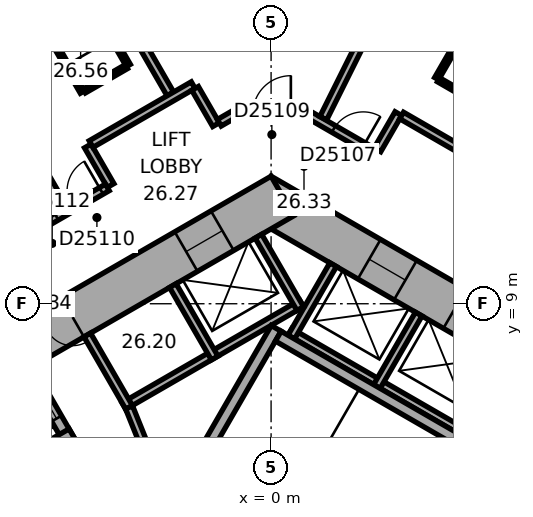
"""IFC4 building model, lengths in metres.
Left out: names, types, materials, properties, quantities, classifications, styles, units other than length and angle.
Written with IfcOpenShell. Run it as: python <this file> out.ifc"""

import sys

from ifc_helpers import new_model, si_unit, direction, frame, frame_2d, origin, place, context, subcontext, project, spatial, rectangle, extrude, element, fill, save


model = new_model("IFC4")
c1 = context("Model", 3, precision=1e-05, world=origin(), true_north=direction((0.0, 1.0)))
c2 = subcontext(c1, "Body", "Model", "MODEL_VIEW")
j1 = project(units=[si_unit("LENGTHUNIT", "METRE"), si_unit("PLANEANGLEUNIT", "RADIAN")], contexts=[c1])
p1 = place(None, origin())
s1 = spatial("IfcSite", under=j1, at=p1, CompositionType="ELEMENT")
p2 = place(p1, origin())
s2 = spatial("IfcBuilding", under=s1, at=p2, CompositionType="ELEMENT")
p3 = place(p2, frame((0.0, 0.0, 110.0)))
s3 = spatial("IfcBuildingStorey", under=s2, at=p3, CompositionType="ELEMENT", Elevation=110.0)
p4 = place(p3, frame((10.4, 5.658, 0.0), z_axis=(0.0, 0.0, 1.0), x_axis=(-0.866021384402, 0.500006961711, 0.0)))
e1 = element("IfcWall", 1, at=p4, inside=s3, PredefinedType="SHEAR", context=c2, shape_type="SweptSolid", body=[
    extrude(rectangle(XDim=12.355, YDim=1.2, at=frame_2d((6.178, 0.0))), origin(), (0.0, 0.0, 1.0), 3.3),
])
p5 = place(p4, frame((2.728, 0.0, 0.0)))
e2 = element("IfcOpeningElement", 2, at=p5, cuts=e1, PredefinedType="OPENING", context=c2, shape_type="SweptSolid", body=[
    extrude(rectangle(XDim=1.1, YDim=2.1, at=frame_2d((0.55, 1.05))), frame((0.0, 0.61, 0.0), z_axis=(0.0, -1.0, 0.0), x_axis=(1.0, 0.0, 0.0)), (0.0, 0.0, 1.0), 1.22),
])
p6 = place(p4, frame((5.328, 0.0, 0.0)))
e3 = element("IfcOpeningElement", 3, at=p6, cuts=e1, PredefinedType="OPENING", context=c2, shape_type="SweptSolid", body=[
    extrude(rectangle(XDim=1.1, YDim=2.1, at=frame_2d((0.55, 1.05))), frame((0.0, 0.61, 0.0), z_axis=(0.0, -1.0, 0.0), x_axis=(1.0, 0.0, 0.0)), (0.0, 0.0, 1.0), 1.22),
])
p7 = place(p4, frame((7.928, 0.0, 0.0)))
e4 = element("IfcOpeningElement", 4, at=p7, cuts=e1, PredefinedType="OPENING", context=c2, shape_type="SweptSolid", body=[
    extrude(rectangle(XDim=1.1, YDim=2.1, at=frame_2d((0.55, 1.05))), frame((0.0, 0.61, 0.0), z_axis=(0.0, -1.0, 0.0), x_axis=(1.0, 0.0, 0.0)), (0.0, 0.0, 1.0), 1.22),
])
p8 = place(p3, frame((0.3, 11.836, 0.0), z_axis=(0.0, 0.0, 1.0), x_axis=(-0.866021384402, -0.500006961711, 0.0)))
e5 = element("IfcWall", 5, at=p8, inside=s3, PredefinedType="SHEAR", context=c2, shape_type="SweptSolid", body=[
    extrude(rectangle(XDim=12.355, YDim=1.2, at=frame_2d((6.178, 0.0))), origin(), (0.0, 0.0, 1.0), 3.3),
])
p9 = place(p8, frame((6.378, 0.0, 0.0)))
e6 = element("IfcOpeningElement", 6, at=p9, cuts=e5, PredefinedType="OPENING", context=c2, shape_type="SweptSolid", body=[
    extrude(rectangle(XDim=1.5, YDim=2.1, at=frame_2d((0.75, 1.05))), frame((0.0, 0.61, 0.0), z_axis=(0.0, -1.0, 0.0), x_axis=(1.0, 0.0, 0.0)), (0.0, 0.0, 1.0), 1.22),
])
p10 = place(p8, frame((1.828, 0.0, 0.0)))
e7 = element("IfcOpeningElement", 7, at=p10, cuts=e5, PredefinedType="OPENING", context=c2, shape_type="SweptSolid", body=[
    extrude(rectangle(XDim=1.1, YDim=2.1, at=frame_2d((0.55, 1.05))), frame((0.0, 0.61, 0.0), z_axis=(0.0, -1.0, 0.0), x_axis=(1.0, 0.0, 0.0)), (0.0, 0.0, 1.0), 1.22),
])
p11 = place(p3, frame((20.63, 15.47, 0.0), z_axis=(0.0, 0.0, 1.0), x_axis=(-0.894934518609, 0.446197498203, 0.0)))
e8 = element("IfcWall", 8, at=p11, inside=s3, PredefinedType="STANDARD", context=c2, shape_type="SweptSolid", body=[
    extrude(rectangle(XDim=21.246, YDim=0.2, at=frame_2d((10.623, 0.0))), origin(), (0.0, 0.0, 1.0), 3.3),
])
p12 = place(p11, frame((1.553, 0.0, 0.8)))
e9 = element("IfcOpeningElement", 9, at=p12, cuts=e8, PredefinedType="OPENING", context=c2, shape_type="SweptSolid", body=[
    extrude(rectangle(XDim=2.4, YDim=1.7, at=frame_2d((1.2, 0.85))), frame((0.0, 0.11, 0.0), z_axis=(0.0, -1.0, 0.0), x_axis=(1.0, 0.0, 0.0)), (0.0, 0.0, 1.0), 0.22),
])
p13 = place(p11, frame((5.488, 0.0, 0.8)))
e10 = element("IfcOpeningElement", 10, at=p13, cuts=e8, PredefinedType="OPENING", context=c2, shape_type="SweptSolid", body=[
    extrude(rectangle(XDim=2.4, YDim=1.7, at=frame_2d((1.2, 0.85))), frame((0.0, 0.11, 0.0), z_axis=(0.0, -1.0, 0.0), x_axis=(1.0, 0.0, 0.0)), (0.0, 0.0, 1.0), 0.22),
])
p14 = place(p11, frame((9.422, 0.0, 0.8)))
e11 = element("IfcOpeningElement", 11, at=p14, cuts=e8, PredefinedType="OPENING", context=c2, shape_type="SweptSolid", body=[
    extrude(rectangle(XDim=2.4, YDim=1.7, at=frame_2d((1.2, 0.85))), frame((0.0, 0.11, 0.0), z_axis=(0.0, -1.0, 0.0), x_axis=(1.0, 0.0, 0.0)), (0.0, 0.0, 1.0), 0.22),
])
p15 = place(p11, frame((13.357, 0.0, 0.8)))
e12 = element("IfcOpeningElement", 12, at=p15, cuts=e8, PredefinedType="OPENING", context=c2, shape_type="SweptSolid", body=[
    extrude(rectangle(XDim=2.4, YDim=1.7, at=frame_2d((1.2, 0.85))), frame((0.0, 0.11, 0.0), z_axis=(0.0, -1.0, 0.0), x_axis=(1.0, 0.0, 0.0)), (0.0, 0.0, 1.0), 0.22),
])
p16 = place(p11, frame((17.292, 0.0, 0.8)))
e13 = element("IfcOpeningElement", 13, at=p16, cuts=e8, PredefinedType="OPENING", context=c2, shape_type="SweptSolid", body=[
    extrude(rectangle(XDim=2.4, YDim=1.7, at=frame_2d((1.2, 0.85))), frame((0.0, 0.11, 0.0), z_axis=(0.0, -1.0, 0.0), x_axis=(1.0, 0.0, 0.0)), (0.0, 0.0, 1.0), 0.22),
])
p17 = place(p3, frame((-3.136, 24.805, 0.0), z_axis=(0.0, 0.0, 1.0), x_axis=(-0.866028291626, -0.499994998079, 0.0)))
e14 = element("IfcWall", 14, at=p17, inside=s3, PredefinedType="STANDARD", context=c2, shape_type="SweptSolid", body=[
    extrude(rectangle(XDim=21.246, YDim=0.2, at=frame_2d((10.623, 0.0))), origin(), (0.0, 0.0, 1.0), 3.3),
])
p18 = place(p17, frame((1.555, 0.0, 0.8)))
e15 = element("IfcOpeningElement", 15, at=p18, cuts=e14, PredefinedType="OPENING", context=c2, shape_type="SweptSolid", body=[
    extrude(rectangle(XDim=2.4, YDim=1.7, at=frame_2d((1.2, 0.85))), frame((0.0, 0.11, 0.0), z_axis=(0.0, -1.0, 0.0), x_axis=(1.0, 0.0, 0.0)), (0.0, 0.0, 1.0), 0.22),
])
p19 = place(p17, frame((5.489, 0.0, 0.8)))
e16 = element("IfcOpeningElement", 16, at=p19, cuts=e14, PredefinedType="OPENING", context=c2, shape_type="SweptSolid", body=[
    extrude(rectangle(XDim=2.4, YDim=1.7, at=frame_2d((1.2, 0.85))), frame((0.0, 0.11, 0.0), z_axis=(0.0, -1.0, 0.0), x_axis=(1.0, 0.0, 0.0)), (0.0, 0.0, 1.0), 0.22),
])
p20 = place(p17, frame((9.424, 0.0, 0.8)))
e17 = element("IfcOpeningElement", 17, at=p20, cuts=e14, PredefinedType="OPENING", context=c2, shape_type="SweptSolid", body=[
    extrude(rectangle(XDim=2.4, YDim=1.7, at=frame_2d((1.2, 0.85))), frame((0.0, 0.11, 0.0), z_axis=(0.0, -1.0, 0.0), x_axis=(1.0, 0.0, 0.0)), (0.0, 0.0, 1.0), 0.22),
])
p21 = place(p17, frame((13.358, 0.0, 0.8)))
e18 = element("IfcOpeningElement", 18, at=p21, cuts=e14, PredefinedType="OPENING", context=c2, shape_type="SweptSolid", body=[
    extrude(rectangle(XDim=2.4, YDim=1.7, at=frame_2d((1.2, 0.85))), frame((0.0, 0.11, 0.0), z_axis=(0.0, -1.0, 0.0), x_axis=(1.0, 0.0, 0.0)), (0.0, 0.0, 1.0), 0.22),
])
p22 = place(p17, frame((17.293, 0.0, 0.8)))
e19 = element("IfcOpeningElement", 19, at=p22, cuts=e14, PredefinedType="OPENING", context=c2, shape_type="SweptSolid", body=[
    extrude(rectangle(XDim=2.4, YDim=1.7, at=frame_2d((1.2, 0.85))), frame((0.0, 0.11, 0.0), z_axis=(0.0, -1.0, 0.0), x_axis=(1.0, 0.0, 0.0)), (0.0, 0.0, 1.0), 0.22),
])
p23 = place(p3, frame((7.424, 4.259, 0.0), z_axis=(0.0, 0.0, 1.0), x_axis=(-0.866026010844, 0.49999894854, 0.0)))
e20 = element("IfcWall", 20, at=p23, inside=s3, PredefinedType="PARTITIONING", context=c2, shape_type="SweptSolid", body=[
    extrude(rectangle(XDim=8.0, YDim=0.2, at=frame_2d((4.0, 0.0))), origin(), (0.0, 0.0, 1.0), 3.05),
])
for number, where, z_axis, x_axis in (
    (21, (2.784, 6.822, 0.0), (0.0, 0.0, 1.0), (0.5, 0.866, 0.0)),
    (22, (0.532, 8.122, 0.0), (0.0, 0.0, 1.0), (0.5, 0.866, 0.0)),
):
    element("IfcWall", number, at=place(p3, frame(where, z_axis=z_axis, x_axis=x_axis)), inside=s3, PredefinedType="PARTITIONING", context=c2, shape_type="SweptSolid", body=[
        extrude(rectangle(XDim=2.2, YDim=0.2, at=frame_2d((1.1, 0.0))), origin(), (0.0, 0.0, 1.0), 3.05),
    ])
p24 = place(p3, frame((0.803, 9.009, 0.0), z_axis=(0.0, 0.0, 1.0), x_axis=(-0.866028230842, -0.499995103361, 0.0)))
e23 = element("IfcWall", 23, at=p24, inside=s3, PredefinedType="PARTITIONING", context=c2, shape_type="SweptSolid", body=[
    extrude(rectangle(XDim=5.4, YDim=0.2, at=frame_2d((2.7, 0.0))), origin(), (0.0, 0.0, 1.0), 3.05),
])
p25 = place(p3, frame((0.767, 8.872, 0.0), z_axis=(0.0, 0.0, 1.0), x_axis=(-0.499994660107, 0.866028486751, 0.0)))
e24 = element("IfcWall", 24, at=p25, inside=s3, PredefinedType="PARTITIONING", context=c2, shape_type="SweptSolid", body=[
    extrude(rectangle(XDim=2.2, YDim=0.2, at=frame_2d((1.1, 0.0))), origin(), (0.0, 0.0, 1.0), 3.05),
])
for number, where, z_axis, x_axis in (
    (25, (-1.485, 7.572, 0.0), (0.0, 0.0, 1.0), (-0.5, 0.866, 0.0)),
    (26, (-3.737, 6.272, 0.0), (0.0, 0.0, 1.0), (-0.5, 0.866, 0.0)),
):
    element("IfcWall", number, at=place(p3, frame(where, z_axis=z_axis, x_axis=x_axis)), inside=s3, PredefinedType="PARTITIONING", context=c2, shape_type="SweptSolid", body=[
        extrude(rectangle(XDim=2.2, YDim=0.2, at=frame_2d((1.1, 0.0))), origin(), (0.0, 0.0, 1.0), 3.05),
    ])
p26 = place(p3, frame((-2.216, 4.282, 0.0), z_axis=(0.0, 0.0, 1.0), x_axis=(0.499977259774, 0.866038532462, 0.0)))
e27 = element("IfcWall", 27, at=p26, inside=s3, PredefinedType="SHEAR", context=c2, shape_type="SweptSolid", body=[
    extrude(rectangle(XDim=4.7, YDim=0.3, at=frame_2d((2.35, 0.0))), origin(), (0.0, 0.0, 1.0), 3.05),
])
p27 = place(p3, frame((6.303, 4.617, 0.0), z_axis=(0.0, 0.0, 1.0), x_axis=(-0.866027801685, 0.499995846692, 0.0)))
e28 = element("IfcWall", 28, at=p27, inside=s3, PredefinedType="SHEAR", context=c2, shape_type="SweptSolid", body=[
    extrude(rectangle(XDim=7.06, YDim=0.3, at=frame_2d((3.53, 0.0))), origin(), (0.0, 0.0, 1.0), 3.05),
])
p28 = place(p3, frame((-5.295, 5.372, 0.0), z_axis=(0.0, 0.0, 1.0), x_axis=(-0.500077893725, 0.86598042715, 0.0)))
e29 = element("IfcWall", 29, at=p28, inside=s3, PredefinedType="SHEAR", context=c2, shape_type="SweptSolid", body=[
    extrude(rectangle(XDim=2.2, YDim=0.3, at=frame_2d((1.1, 0.0))), origin(), (0.0, 0.0, 1.0), 3.05),
])
p29 = place(p28, frame((0.7, 0.0, 0.0)))
e30 = element("IfcOpeningElement", 30, at=p29, cuts=e29, PredefinedType="OPENING", context=c2, shape_type="SweptSolid", body=[
    extrude(rectangle(XDim=1.1, YDim=2.1, at=frame_2d((0.55, 1.05))), frame((0.0, 0.16, 0.0), z_axis=(0.0, -1.0, 0.0), x_axis=(1.0, 0.0, 0.0)), (0.0, 0.0, 1.0), 0.32),
])
p30 = place(p3, frame((-5.24, 5.577, 0.0), z_axis=(0.0, 0.0, 1.0), x_axis=(-0.866014461049, -0.500018952895, 0.0)))
e31 = element("IfcWall", 31, at=p30, inside=s3, PredefinedType="SHEAR", context=c2, shape_type="SweptSolid", body=[
    extrude(rectangle(XDim=3.35, YDim=0.3, at=frame_2d((1.675, 0.0))), origin(), (0.0, 0.0, 1.0), 3.05),
])
p31 = place(p3, frame((-2.615, 3.487, 0.0), z_axis=(0.0, 0.0, 1.0), x_axis=(-0.373576831041, 0.92759924068, 0.0)))
e32 = element("IfcWall", 32, at=p31, inside=s3, PredefinedType="PARTITIONING", context=c2, shape_type="SweptSolid", body=[
    extrude(rectangle(XDim=3.002, YDim=0.2, at=frame_2d((1.501, 0.0))), origin(), (0.0, 0.0, 1.0), 3.05),
])
p32 = place(p31, frame((1.15, 0.0, 0.0)))
e33 = element("IfcOpeningElement", 33, at=p32, cuts=e32, PredefinedType="OPENING", context=c2, shape_type="SweptSolid", body=[
    extrude(rectangle(XDim=0.9, YDim=2.1, at=frame_2d((0.45, 1.05))), frame((0.0, 0.11, 0.0), z_axis=(0.0, -1.0, 0.0), x_axis=(1.0, 0.0, 0.0)), (0.0, 0.0, 1.0), 0.22),
])
p33 = place(p3, frame((-10.083, 19.524, 0.0), z_axis=(0.0, 0.0, 1.0), x_axis=(0.499999662836, -0.866025598446, 0.0)))
e34 = element("IfcWall", 34, at=p33, inside=s3, PredefinedType="PARTITIONING", context=c2, shape_type="SweptSolid", body=[
    extrude(rectangle(XDim=9.25, YDim=0.2, at=frame_2d((4.625, 0.0))), origin(), (0.0, 0.0, 1.0), 2.6),
])
p34 = place(p3, frame((-6.676, 21.492, 0.0), z_axis=(0.0, 0.0, 1.0), x_axis=(0.500011263043, -0.866018900966, 0.0)))
e35 = element("IfcWall", 35, at=p34, inside=s3, PredefinedType="PARTITIONING", context=c2, shape_type="SweptSolid", body=[
    extrude(rectangle(XDim=8.049, YDim=0.2, at=frame_2d((4.024, 0.0))), origin(), (0.0, 0.0, 1.0), 3.05),
])
p35 = place(p3, frame((-5.026, 17.469, 0.0), z_axis=(0.0, 0.0, 1.0), x_axis=(0.500005339912, -0.866022320763, 0.0)))
e36 = element("IfcWall", 36, at=p35, inside=s3, PredefinedType="PARTITIONING", context=c2, shape_type="SweptSolid", body=[
    extrude(rectangle(XDim=2.54, YDim=0.12, at=frame_2d((1.27, 0.0))), origin(), (0.0, 0.0, 1.0), 3.05),
])
p36 = place(p3, frame((-4.968, 14.569, 0.0), z_axis=(0.0, 0.0, 1.0), x_axis=(-0.500046963369, 0.865998287773, 0.0)))
e37 = element("IfcWall", 37, at=p36, inside=s3, PredefinedType="PARTITIONING", context=c2, shape_type="SweptSolid", body=[
    extrude(rectangle(XDim=2.54, YDim=0.12, at=frame_2d((1.27, 0.0))), origin(), (0.0, 0.0, 1.0), 3.05),
])
p37 = place(p36, frame((0.82, 0.0, 0.0)))
e38 = element("IfcOpeningElement", 38, at=p37, cuts=e37, PredefinedType="OPENING", context=c2, shape_type="SweptSolid", body=[
    extrude(rectangle(XDim=0.9, YDim=2.1, at=frame_2d((0.45, 1.05))), frame((0.0, 0.07, 0.0), z_axis=(0.0, -1.0, 0.0), x_axis=(1.0, 0.0, 0.0)), (0.0, 0.0, 1.0), 0.14),
])
p38 = place(p3, frame((-4.823, 13.152, 0.0), z_axis=(0.0, 0.0, 1.0), x_axis=(0.499986357472, -0.866033280158, 0.0)))
e39 = element("IfcWall", 39, at=p38, inside=s3, PredefinedType="PARTITIONING", context=c2, shape_type="SweptSolid", body=[
    extrude(rectangle(XDim=1.201, YDim=0.2, at=frame_2d((0.601, 0.0))), origin(), (0.0, 0.0, 1.0), 3.05),
])
p39 = place(p3, frame((-4.309, 12.061, 0.0), z_axis=(0.0, 0.0, 1.0), x_axis=(-0.866020679205, -0.500008183122, 0.0)))
e40 = element("IfcWall", 40, at=p39, inside=s3, PredefinedType="PARTITIONING", context=c2, shape_type="SweptSolid", body=[
    extrude(rectangle(XDim=5.104, YDim=0.2, at=frame_2d((2.552, 0.0))), origin(), (0.0, 0.0, 1.0), 3.05),
])
p40 = place(p39, frame((0.185, 0.0, 0.0)))
e41 = element("IfcOpeningElement", 41, at=p40, cuts=e40, PredefinedType="OPENING", context=c2, shape_type="SweptSolid", body=[
    extrude(rectangle(XDim=0.9, YDim=2.1, at=frame_2d((0.45, 1.05))), frame((0.0, 0.11, 0.0), z_axis=(0.0, -1.0, 0.0), x_axis=(1.0, 0.0, 0.0)), (0.0, 0.0, 1.0), 0.22),
])
p41 = place(p39, frame((1.544, 0.0, 0.0)))
e42 = element("IfcOpeningElement", 42, at=p41, cuts=e40, PredefinedType="OPENING", context=c2, shape_type="SweptSolid", body=[
    extrude(rectangle(XDim=0.9, YDim=2.1, at=frame_2d((0.45, 1.05))), frame((0.0, 0.11, 0.0), z_axis=(0.0, -1.0, 0.0), x_axis=(1.0, 0.0, 0.0)), (0.0, 0.0, 1.0), 0.22),
])
p42 = place(p3, frame((-3.808, 15.239, 0.0), z_axis=(0.0, 0.0, 1.0), x_axis=(-0.866087136806, -0.499893060024, 0.0)))
e43 = element("IfcWall", 43, at=p42, inside=s3, PredefinedType="PARTITIONING", context=c2, shape_type="SweptSolid", body=[
    extrude(rectangle(XDim=1.28, YDim=0.12, at=frame_2d((0.64, 0.0))), origin(), (0.0, 0.0, 1.0), 3.05),
])
p43 = place(p3, frame((-2.05, 14.752, 0.0), z_axis=(0.0, 0.0, 1.0), x_axis=(-0.866030936828, -0.499990416364, 0.0)))
e44 = element("IfcWall", 44, at=p43, inside=s3, PredefinedType="PARTITIONING", context=c2, shape_type="SweptSolid", body=[
    extrude(rectangle(XDim=3.102, YDim=0.2, at=frame_2d((1.551, 0.0))), origin(), (0.0, 0.0, 1.0), 3.05),
])
p44 = place(p3, frame((-1.449, 13.712, 0.0), z_axis=(0.0, 0.0, 1.0), x_axis=(-0.499978356969, 0.866037899034, 0.0)))
e45 = element("IfcWall", 45, at=p44, inside=s3, PredefinedType="PARTITIONING", context=c2, shape_type="SweptSolid", body=[
    extrude(rectangle(XDim=1.101, YDim=0.2, at=frame_2d((0.551, 0.0))), origin(), (0.0, 0.0, 1.0), 3.05),
])
p45 = place(p3, frame((-0.95, 14.001, 0.0), z_axis=(0.0, 0.0, 1.0), x_axis=(-0.86609177584, -0.499885022602, 0.0)))
e46 = element("IfcWall", 46, at=p45, inside=s3, PredefinedType="PARTITIONING", context=c2, shape_type="SweptSolid", body=[
    extrude(rectangle(XDim=0.477, YDim=0.2, at=frame_2d((0.238, 0.0))), origin(), (0.0, 0.0, 1.0), 3.05),
])
p46 = place(p3, frame((0.95, 14.001, 0.0), z_axis=(0.0, 0.0, 1.0), x_axis=(-1.0, 0.0, 0.0)))
e47 = element("IfcWall", 47, at=p46, inside=s3, PredefinedType="PARTITIONING", context=c2, shape_type="SweptSolid", body=[
    extrude(rectangle(XDim=1.86, YDim=0.2, at=frame_2d((0.93, 0.0))), origin(), (0.0, 0.0, 1.0), 3.05),
])
p47 = place(p46, frame((0.43, 0.0, 0.0)))
e48 = element("IfcOpeningElement", 48, at=p47, cuts=e47, PredefinedType="OPENING", context=c2, shape_type="SweptSolid", body=[
    extrude(rectangle(XDim=1.0, YDim=2.1, at=frame_2d((0.5, 1.05))), frame((0.0, 0.11, 0.0), z_axis=(0.0, -1.0, 0.0), x_axis=(1.0, 0.0, 0.0)), (0.0, 0.0, 1.0), 0.22),
])
p48 = place(p3, frame((2.748, 12.962, 0.0), z_axis=(0.0, 0.0, 1.0), x_axis=(-0.866013897511, 0.50001992892, 0.0)))
e49 = element("IfcWall", 49, at=p48, inside=s3, PredefinedType="PARTITIONING", context=c2, shape_type="SweptSolid", body=[
    extrude(rectangle(XDim=2.037, YDim=0.2, at=frame_2d((1.018, 0.0))), origin(), (0.0, 0.0, 1.0), 3.05),
])
p49 = place(p48, frame((0.372, 0.0, 0.0)))
e50 = element("IfcOpeningElement", 50, at=p49, cuts=e49, PredefinedType="OPENING", context=c2, shape_type="SweptSolid", body=[
    extrude(rectangle(XDim=0.9, YDim=2.1, at=frame_2d((0.45, 1.05))), frame((0.0, 0.11, 0.0), z_axis=(0.0, -1.0, 0.0), x_axis=(1.0, 0.0, 0.0)), (0.0, 0.0, 1.0), 0.22),
])
p50 = place(p3, frame((3.349, 14.002, 0.0), z_axis=(0.0, 0.0, 1.0), x_axis=(-0.500074377092, -0.865982457891, 0.0)))
e51 = element("IfcWall", 51, at=p50, inside=s3, PredefinedType="PARTITIONING", context=c2, shape_type="SweptSolid", body=[
    extrude(rectangle(XDim=1.101, YDim=0.2, at=frame_2d((0.55, 0.0))), origin(), (0.0, 0.0, 1.0), 3.05),
])
p51 = place(p3, frame((4.356, 14.922, 0.0), z_axis=(0.0, 0.0, 1.0), x_axis=(0.499936506574, 0.866062058628, 0.0)))
e52 = element("IfcWall", 52, at=p51, inside=s3, PredefinedType="PARTITIONING", context=c2, shape_type="SweptSolid", body=[
    extrude(rectangle(XDim=2.6, YDim=0.12, at=frame_2d((1.3, 0.0))), origin(), (0.0, 0.0, 1.0), 3.05),
])
p52 = place(p51, frame((0.85, 0.0, 0.0)))
e53 = element("IfcOpeningElement", 53, at=p52, cuts=e52, PredefinedType="OPENING", context=c2, shape_type="SweptSolid", body=[
    extrude(rectangle(XDim=0.9, YDim=2.1, at=frame_2d((0.45, 1.05))), frame((0.0, 0.07, 0.0), z_axis=(0.0, -1.0, 0.0), x_axis=(1.0, 0.0, 0.0)), (0.0, 0.0, 1.0), 0.14),
])
p53 = place(p3, frame((5.351, 21.859, 0.0), z_axis=(0.0, 0.0, 1.0), x_axis=(-0.446205309328, -0.894930624086, 0.0)))
e54 = element("IfcWall", 54, at=p53, inside=s3, PredefinedType="PARTITIONING", context=c2, shape_type="SweptSolid", body=[
    extrude(rectangle(XDim=8.913, YDim=0.2, at=frame_2d((4.457, 0.0))), origin(), (0.0, 0.0, 1.0), 2.6),
])
p54 = place(p3, frame((5.569, 14.222, 0.0), z_axis=(0.0, 0.0, 1.0), x_axis=(-0.866036909293, 0.499980071345, 0.0)))
e55 = element("IfcWall", 55, at=p54, inside=s3, PredefinedType="PARTITIONING", context=c2, shape_type="SweptSolid", body=[
    extrude(rectangle(XDim=1.34, YDim=0.12, at=frame_2d((0.67, 0.0))), origin(), (0.0, 0.0, 1.0), 3.05),
])
p55 = place(p3, frame((10.885, 9.652, 0.0), z_axis=(0.0, 0.0, 1.0), x_axis=(-0.866033868542, 0.499985338323, 0.0)))
e56 = element("IfcWall", 56, at=p55, inside=s3, PredefinedType="PARTITIONING", context=c2, shape_type="SweptSolid", body=[
    extrude(rectangle(XDim=8.602, YDim=0.2, at=frame_2d((4.301, 0.0))), origin(), (0.0, 0.0, 1.0), 3.05),
])
p56 = place(p55, frame((2.739, 0.0, 0.0)))
e57 = element("IfcOpeningElement", 57, at=p56, cuts=e56, PredefinedType="OPENING", context=c2, shape_type="SweptSolid", body=[
    extrude(rectangle(XDim=1.0, YDim=2.1, at=frame_2d((0.5, 1.05))), frame((0.0, 0.11, 0.0), z_axis=(0.0, -1.0, 0.0), x_axis=(1.0, 0.0, 0.0)), (0.0, 0.0, 1.0), 0.22),
])
p57 = place(p9, origin())
e58 = element("IfcDoor", 58, at=p57, inside=s3, OperationType="DOUBLE_DOOR_SINGLE_SWING", PredefinedType="DOOR", context=c2, shape_type="SweptSolid", body=[
    extrude(rectangle(XDim=1.5, YDim=2.1, at=frame_2d((0.75, 1.05))), frame((0.0, 0.025, 0.0), z_axis=(0.0, -1.0, 0.0), x_axis=(1.0, 0.0, 0.0)), (0.0, 0.0, 1.0), 0.05),
])
fill(e6, e58)
p58 = place(p29, origin())
e59 = element("IfcDoor", 59, at=p58, inside=s3, OperationType="DOUBLE_DOOR_SLIDING", PredefinedType="DOOR", context=c2, shape_type="SweptSolid", body=[
    extrude(rectangle(XDim=1.1, YDim=2.1, at=frame_2d((0.55, 1.05))), frame((0.0, 0.025, 0.0), z_axis=(0.0, -1.0, 0.0), x_axis=(1.0, 0.0, 0.0)), (0.0, 0.0, 1.0), 0.05),
])
fill(e30, e59)
p59 = place(p7, origin())
e60 = element("IfcDoor", 60, at=p59, inside=s3, OperationType="DOUBLE_DOOR_SLIDING", PredefinedType="DOOR", context=c2, shape_type="SweptSolid", body=[
    extrude(rectangle(XDim=1.1, YDim=2.1, at=frame_2d((0.55, 1.05))), frame((0.0, 0.025, 0.0), z_axis=(0.0, -1.0, 0.0), x_axis=(1.0, 0.0, 0.0)), (0.0, 0.0, 1.0), 0.05),
])
fill(e4, e60)
p60 = place(p10, origin())
e61 = element("IfcDoor", 61, at=p60, inside=s3, OperationType="DOUBLE_DOOR_SLIDING", PredefinedType="DOOR", context=c2, shape_type="SweptSolid", body=[
    extrude(rectangle(XDim=1.1, YDim=2.1, at=frame_2d((0.55, 1.05))), frame((0.0, 0.025, 0.0), z_axis=(0.0, -1.0, 0.0), x_axis=(1.0, 0.0, 0.0)), (0.0, 0.0, 1.0), 0.05),
])
fill(e7, e61)
p61 = place(p49, origin())
e62 = element("IfcDoor", 62, at=p61, inside=s3, OperationType="SINGLE_SWING_LEFT", PredefinedType="DOOR", context=c2, shape_type="SweptSolid", body=[
    extrude(rectangle(XDim=0.9, YDim=2.1, at=frame_2d((0.45, 1.05))), frame((0.0, 0.025, 0.0), z_axis=(0.0, -1.0, 0.0), x_axis=(1.0, 0.0, 0.0)), (0.0, 0.0, 1.0), 0.05),
])
fill(e50, e62)
p62 = place(p47, origin())
e63 = element("IfcDoor", 63, at=p62, inside=s3, OperationType="SINGLE_SWING_LEFT", PredefinedType="DOOR", context=c2, shape_type="SweptSolid", body=[
    extrude(rectangle(XDim=1.0, YDim=2.1, at=frame_2d((0.5, 1.05))), frame((0.0, 0.025, 0.0), z_axis=(0.0, -1.0, 0.0), x_axis=(1.0, 0.0, 0.0)), (0.0, 0.0, 1.0), 0.05),
])
fill(e48, e63)
p63 = place(p40, origin())
e64 = element("IfcDoor", 64, at=p63, inside=s3, OperationType="SINGLE_SWING_LEFT", PredefinedType="DOOR", context=c2, shape_type="SweptSolid", body=[
    extrude(rectangle(XDim=0.9, YDim=2.1, at=frame_2d((0.45, 1.05))), frame((0.0, 0.025, 0.0), z_axis=(0.0, -1.0, 0.0), x_axis=(1.0, 0.0, 0.0)), (0.0, 0.0, 1.0), 0.05),
])
fill(e41, e64)
p64 = place(p37, origin())
e65 = element("IfcDoor", 65, at=p64, inside=s3, OperationType="SINGLE_SWING_LEFT", PredefinedType="DOOR", context=c2, shape_type="SweptSolid", body=[
    extrude(rectangle(XDim=0.9, YDim=2.1, at=frame_2d((0.45, 1.05))), frame((0.0, 0.025, 0.0), z_axis=(0.0, -1.0, 0.0), x_axis=(1.0, 0.0, 0.0)), (0.0, 0.0, 1.0), 0.05),
])
fill(e38, e65)
p65 = place(p41, origin())
e66 = element("IfcDoor", 66, at=p65, inside=s3, OperationType="SINGLE_SWING_LEFT", PredefinedType="DOOR", context=c2, shape_type="SweptSolid", body=[
    extrude(rectangle(XDim=0.9, YDim=2.1, at=frame_2d((0.45, 1.05))), frame((0.0, 0.025, 0.0), z_axis=(0.0, -1.0, 0.0), x_axis=(1.0, 0.0, 0.0)), (0.0, 0.0, 1.0), 0.05),
])
fill(e42, e66)
save(model, sys.argv[1])
